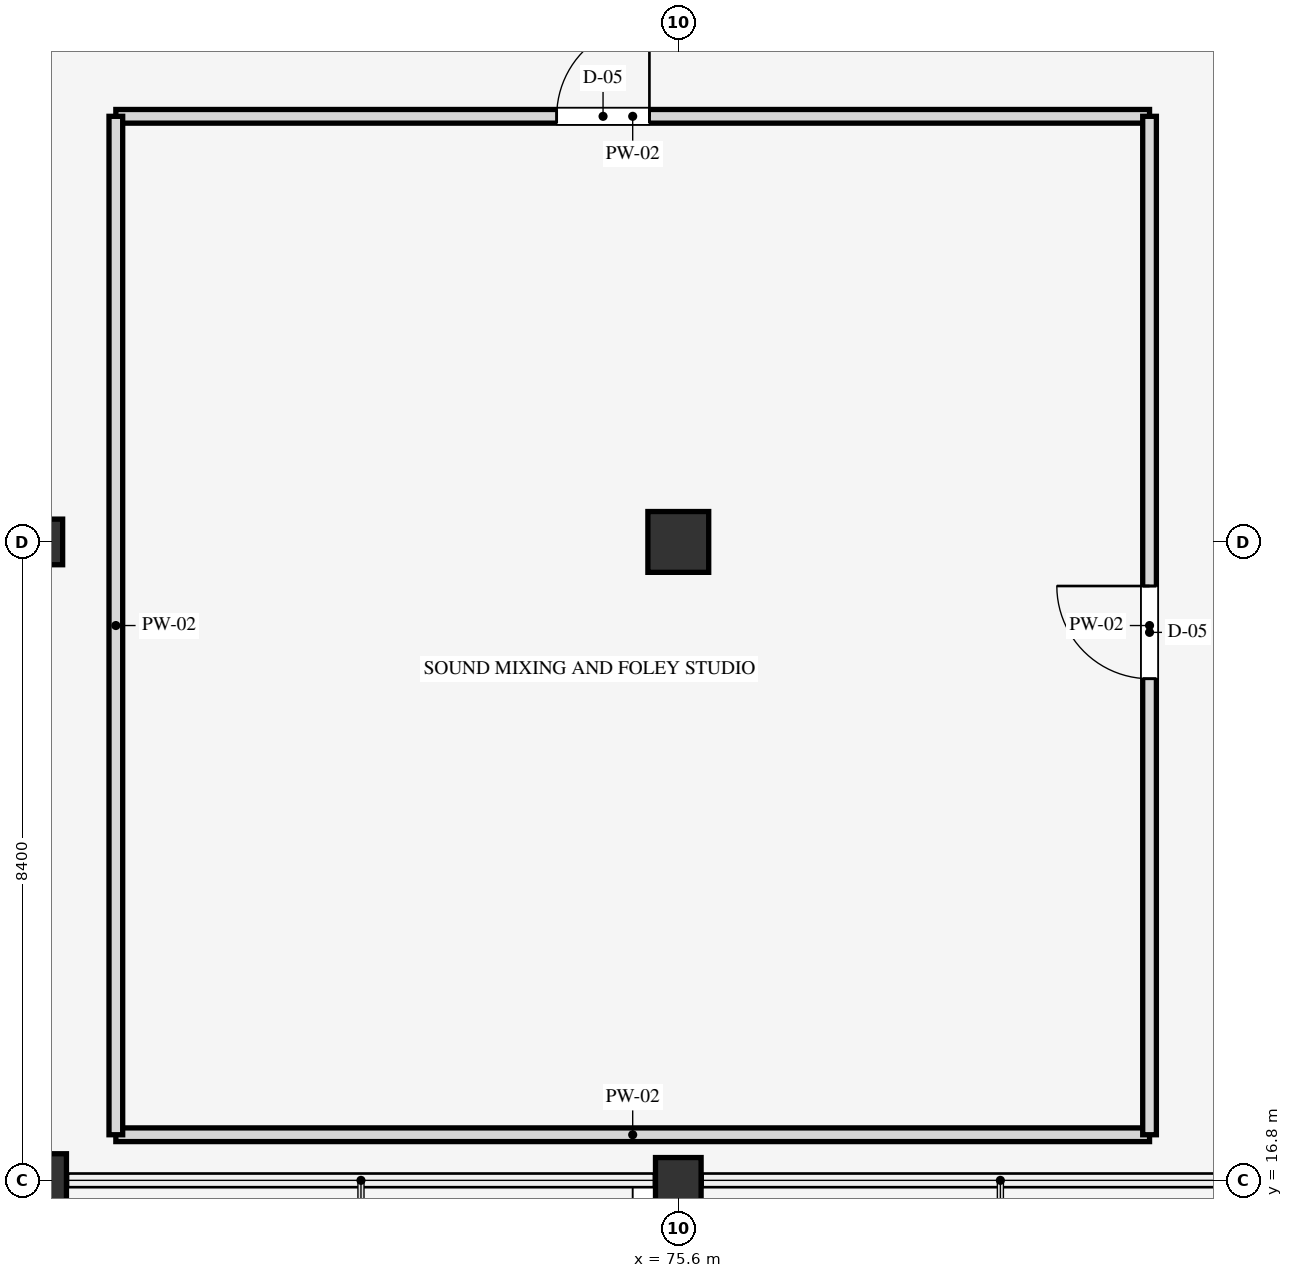
"""IFC4 building model, lengths in metres.
Left out: names, types, materials, properties, quantities, classifications, styles, units other than length and angle.
Written with IfcOpenShell. Run it as: python <this file> out.ifc"""

import sys

from ifc_helpers import new_model, si_unit, direction, frame, frame_2d, origin, origin_2d, place, context, subcontext, project, spatial, rectangle, extrude, element, fill, save


model = new_model("IFC4")
c1 = context("Model", 3, precision=1e-05, world=origin(), true_north=direction((0.0, 1.0)))
c2 = subcontext(c1, "Body", "Model", "MODEL_VIEW")
j1 = project(units=[si_unit("LENGTHUNIT", "METRE"), si_unit("PLANEANGLEUNIT", "RADIAN")], contexts=[c1])
p1 = place(None, origin())
s1 = spatial("IfcSite", under=j1, at=p1, CompositionType="ELEMENT")
p2 = place(p1, origin())
s2 = spatial("IfcBuilding", under=s1, at=p2, CompositionType="ELEMENT")
p3 = place(p2, frame((0.0, 0.0, 9.9)))
s3 = spatial("IfcBuildingStorey", under=s2, at=p3, CompositionType="ELEMENT", Elevation=9.9)
p4 = place(p3, frame((67.2, 16.8, 0.0), z_axis=(0.0, 0.0, 1.0), x_axis=(1.0, 0.0, 0.0)))
e1 = element("IfcColumn", 1, at=p4, inside=s3, PredefinedType="COLUMN", context=c2, shape_type="SweptSolid", body=[
    extrude(rectangle(XDim=0.7, YDim=0.7, at=origin_2d()), origin(), (0.0, 0.0, 1.0), 4.5),
])
for number, where, z_axis, x_axis in (
    (2, (67.2, 25.2, 0.0), (0.0, 0.0, 1.0), (1.0, 0.0, 0.0)),
    (3, (75.6, 16.8, 0.0), (0.0, 0.0, 1.0), (1.0, 0.0, 0.0)),
):
    element("IfcColumn", number, at=place(p3, frame(where, z_axis=z_axis, x_axis=x_axis)), inside=s3, PredefinedType="COLUMN", context=c2, shape_type="SweptSolid", body=[
        extrude(rectangle(XDim=0.6, YDim=0.6, at=origin_2d()), origin(), (0.0, 0.0, 1.0), 4.5),
    ])
p5 = place(p3, frame((75.6, 25.2, 0.0), z_axis=(0.0, 0.0, 1.0), x_axis=(1.0, 0.0, 0.0)))
e4 = element("IfcColumn", 4, at=p5, inside=s3, PredefinedType="COLUMN", context=c2, shape_type="SweptSolid", body=[
    extrude(rectangle(XDim=0.8, YDim=0.8, at=origin_2d()), origin(), (0.0, 0.0, 1.0), 4.5),
])
p6 = place(p3, frame((68.2, 17.4, 0.0), z_axis=(0.0, 0.0, 1.0), x_axis=(1.0, 0.0, 0.0)))
e5 = element("IfcWall", 5, at=p6, inside=s3, PredefinedType="PARTITIONING", context=c2, shape_type="SweptSolid", body=[
    extrude(rectangle(XDim=13.6, YDim=0.18, at=frame_2d((6.8, 0.0))), origin(), (0.0, 0.0, 1.0), 3.54),
])
p7 = place(p3, frame((68.2, 30.8, 0.0), z_axis=(0.0, 0.0, 1.0), x_axis=(1.0, 0.0, 0.0)))
e6 = element("IfcWall", 6, at=p7, inside=s3, PredefinedType="PARTITIONING", context=c2, shape_type="SweptSolid", body=[
    extrude(rectangle(XDim=13.6, YDim=0.18, at=frame_2d((6.8, 0.0))), origin(), (0.0, 0.0, 1.0), 3.54),
])
p8 = place(p7, frame((5.8, 0.0, 0.0)))
e7 = element("IfcOpeningElement", 7, at=p8, cuts=e6, PredefinedType="OPENING", context=c2, shape_type="SweptSolid", body=[
    extrude(rectangle(XDim=1.22, YDim=2.15, at=frame_2d((0.61, 1.075))), frame((0.0, 0.1, 0.0), z_axis=(0.0, -1.0, 0.0), x_axis=(1.0, 0.0, 0.0)), (0.0, 0.0, 1.0), 0.2),
])
p9 = place(p3, frame((68.2, 17.4, 0.0), z_axis=(0.0, 0.0, 1.0), x_axis=(0.0, 1.0, 0.0)))
e8 = element("IfcWall", 8, at=p9, inside=s3, PredefinedType="PARTITIONING", context=c2, shape_type="SweptSolid", body=[
    extrude(rectangle(XDim=13.4, YDim=0.18, at=frame_2d((6.7, 0.0))), origin(), (0.0, 0.0, 1.0), 3.54),
])
p10 = place(p3, frame((81.8, 17.4, 0.0), z_axis=(0.0, 0.0, 1.0), x_axis=(0.0, 1.0, 0.0)))
e9 = element("IfcWall", 9, at=p10, inside=s3, PredefinedType="PARTITIONING", context=c2, shape_type="SweptSolid", body=[
    extrude(rectangle(XDim=13.4, YDim=0.18, at=frame_2d((6.7, 0.0))), origin(), (0.0, 0.0, 1.0), 3.54),
])
p11 = place(p10, frame((6.0, 0.0, 0.0)))
e10 = element("IfcOpeningElement", 10, at=p11, cuts=e9, PredefinedType="OPENING", context=c2, shape_type="SweptSolid", body=[
    extrude(rectangle(XDim=1.22, YDim=2.15, at=frame_2d((0.61, 1.075))), frame((0.0, 0.1, 0.0), z_axis=(0.0, -1.0, 0.0), x_axis=(1.0, 0.0, 0.0)), (0.0, 0.0, 1.0), 0.2),
])
p12 = place(p8, origin())
e11 = element("IfcDoor", 11, at=p12, inside=s3, OperationType="SINGLE_SWING_RIGHT", PredefinedType="DOOR", context=c2, shape_type="SweptSolid", body=[
    extrude(rectangle(XDim=1.22, YDim=2.15, at=frame_2d((0.61, 1.075))), frame((0.0, 0.025, 0.0), z_axis=(0.0, -1.0, 0.0), x_axis=(1.0, 0.0, 0.0)), (0.0, 0.0, 1.0), 0.05),
])
fill(e7, e11)
p13 = place(p11, origin())
e12 = element("IfcDoor", 12, at=p13, inside=s3, OperationType="SINGLE_SWING_RIGHT", PredefinedType="DOOR", context=c2, shape_type="SweptSolid", body=[
    extrude(rectangle(XDim=1.22, YDim=2.15, at=frame_2d((0.61, 1.075))), frame((0.0, 0.025, 0.0), z_axis=(0.0, -1.0, 0.0), x_axis=(1.0, 0.0, 0.0)), (0.0, 0.0, 1.0), 0.05),
])
fill(e10, e12)
save(model, sys.argv[1])
